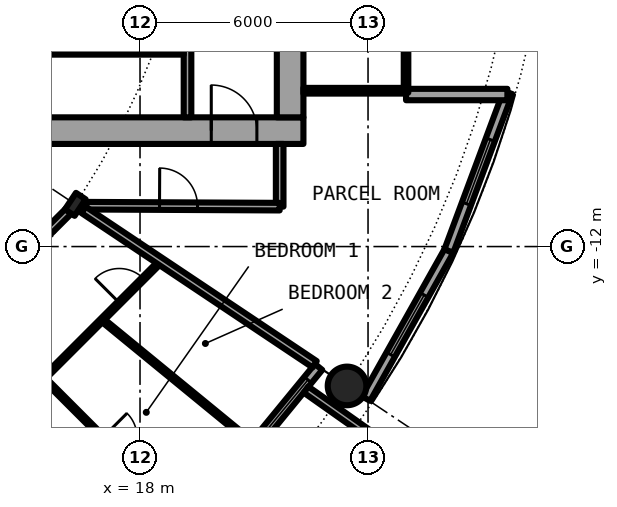
"""IFC4 building model, lengths in metres.
Left out: names, types, materials, properties, quantities, classifications, styles, units other than length and angle.
Written with IfcOpenShell. Run it as: python <this file> out.ifc"""

import sys

from ifc_helpers import new_model, si_unit, direction, frame, frame_2d, origin, origin_2d, place, context, subcontext, project, spatial, rectangle, hollow_circle, i_section, extrude, element, fill, save


model = new_model("IFC4")
c1 = context("Model", 3, precision=1e-05, world=origin(), true_north=direction((0.0, 1.0)))
c2 = subcontext(c1, "Body", "Model", "MODEL_VIEW")
j1 = project(units=[si_unit("LENGTHUNIT", "METRE"), si_unit("PLANEANGLEUNIT", "RADIAN")], contexts=[c1])
p1 = place(None, origin())
s1 = spatial("IfcSite", under=j1, at=p1, CompositionType="ELEMENT")
p2 = place(p1, origin())
s2 = spatial("IfcBuilding", under=s1, at=p2, CompositionType="ELEMENT")
p3 = place(p2, frame((0.0, 0.0, 88.0)))
s3 = spatial("IfcBuildingStorey", under=s2, at=p3, CompositionType="ELEMENT", Elevation=88.0)
p4 = place(p3, frame((23.448, -15.667, 0.0), z_axis=(0.0, 0.0, 1.0), x_axis=(1.0, 0.0, 0.0)))
e1 = element("IfcColumn", 1, at=p4, inside=s3, PredefinedType="COLUMN", context=c2, shape_type="SweptSolid", body=[
    extrude(hollow_circle(Radius=0.508, WallThickness=0.04, at=origin_2d()), origin(), (0.0, 0.0, 1.0), 3.05),
])
p5 = place(p3, frame((16.297, -10.889, 0.0), z_axis=(0.0, 0.0, 1.0), x_axis=(0.831469612303, -0.55557023302, 0.0)))
e2 = element("IfcColumn", 2, at=p5, inside=s3, PredefinedType="COLUMN", context=c2, shape_type="SweptSolid", body=[
    extrude(i_section(OverallWidth=0.306, OverallDepth=0.524, WebThickness=0.021, FlangeThickness=0.04, FilletRadius=0.027, at=origin_2d()), origin(), (0.0, 0.0, 1.0), 3.05),
])
p6 = place(p3, frame((19.304, -19.304, 0.0), z_axis=(0.0, 0.0, 1.0), x_axis=(0.634382322723, 0.773019449054, 0.0)))
e3 = element("IfcWall", 3, at=p6, inside=s3, PredefinedType="SOLIDWALL", context=c2, shape_type="SweptSolid", body=[
    extrude(rectangle(XDim=5.352, YDim=0.25, at=frame_2d((2.676, 0.0))), origin(), (0.0, 0.0, 1.0), 2.7),
])
p7 = place(p6, frame((0.841, 0.0, 0.0)))
e4 = element("IfcOpeningElement", 4, at=p7, cuts=e3, PredefinedType="OPENING", context=c2, shape_type="SweptSolid", body=[
    extrude(rectangle(XDim=1.0, YDim=2.2, at=frame_2d((0.5, 1.1))), frame((0.0, 0.135, 0.0), z_axis=(0.0, -1.0, 0.0), x_axis=(1.0, 0.0, 0.0)), (0.0, 0.0, 1.0), 0.27),
])
p8 = place(p6, frame((3.111, 0.0, 0.3)))
e5 = element("IfcOpeningElement", 5, at=p8, cuts=e3, PredefinedType="OPENING", context=c2, shape_type="SweptSolid", body=[
    extrude(rectangle(XDim=1.8, YDim=2.1, at=frame_2d((0.9, 1.05))), frame((0.0, 0.135, 0.0), z_axis=(0.0, -1.0, 0.0), x_axis=(1.0, 0.0, 0.0)), (0.0, 0.0, 1.0), 0.27),
])
p9 = place(p3, frame((22.37, -15.765, -0.03), z_axis=(0.0, 0.0, 1.0), x_axis=(0.817256123454, -0.576274612209, 0.0)))
e6 = element("IfcWall", 6, at=p9, inside=s3, PredefinedType="SOLIDWALL", context=c2, shape_type="SweptSolid", body=[
    extrude(rectangle(XDim=2.933, YDim=0.2, at=frame_2d((1.466, 0.0))), origin(), (0.0, 0.0, 1.0), 2.73),
])
p10 = place(p3, frame((23.946, -16.0, 0.0), z_axis=(0.0, 0.0, 1.0), x_axis=(0.489696356642, 0.871893042919, 0.0)))
e7 = element("IfcWall", 7, at=p10, inside=s3, PredefinedType="SOLIDWALL", context=c2, shape_type="SweptSolid", body=[
    extrude(rectangle(XDim=4.454, YDim=0.25, at=frame_2d((2.227, 0.0))), origin(), (0.0, 0.0, 1.0), 2.7),
])
p11 = place(p10, frame((1.327, 0.0, 0.3)))
e8 = element("IfcOpeningElement", 8, at=p11, cuts=e7, PredefinedType="OPENING", context=c2, shape_type="SweptSolid", body=[
    extrude(rectangle(XDim=1.8, YDim=2.1, at=frame_2d((0.9, 1.05))), frame((0.0, 0.135, 0.0), z_axis=(0.0, -1.0, 0.0), x_axis=(1.0, 0.0, 0.0)), (0.0, 0.0, 1.0), 0.27),
])
p12 = place(p3, frame((26.127, -12.117, 0.0), z_axis=(0.0, 0.0, 1.0), x_axis=(0.349247811493, 0.937030397675, 0.0)))
e9 = element("IfcWall", 9, at=p12, inside=s3, PredefinedType="SOLIDWALL", context=c2, shape_type="SweptSolid", body=[
    extrude(rectangle(XDim=4.452, YDim=0.25, at=frame_2d((2.226, 0.0))), origin(), (0.0, 0.0, 1.0), 2.7),
])
p13 = place(p12, frame((1.327, 0.0, 0.3)))
e10 = element("IfcOpeningElement", 10, at=p13, cuts=e9, PredefinedType="OPENING", context=c2, shape_type="SweptSolid", body=[
    extrude(rectangle(XDim=1.8, YDim=2.1, at=frame_2d((0.9, 1.05))), frame((0.0, 0.135, 0.0), z_axis=(0.0, -1.0, 0.0), x_axis=(1.0, 0.0, 0.0)), (0.0, 0.0, 1.0), 0.27),
])
p14 = place(p3, frame((25.0, -8.0, 0.0), z_axis=(0.0, 0.0, 1.0), x_axis=(1.0, 0.0, 0.0)))
e11 = element("IfcWall", 11, at=p14, inside=s3, PredefinedType="SOLIDWALL", context=c2, shape_type="SweptSolid", body=[
    extrude(rectangle(XDim=2.667, YDim=0.3, at=frame_2d((1.333, 0.0))), origin(), (0.0, 0.0, 1.0), 2.7),
])
p15 = place(p3, frame((8.3, -8.95, 0.0), z_axis=(0.0, 0.0, 1.0), x_axis=(1.0, 0.0, 0.0)))
e12 = element("IfcWall", 12, at=p15, inside=s3, PredefinedType="SHEAR", context=c2, shape_type="SweptSolid", body=[
    extrude(rectangle(XDim=14.0, YDim=0.7, at=frame_2d((7.0, 0.0))), origin(), (0.0, 0.0, 1.0), 3.05),
])
p16 = place(p15, frame((11.575, 0.0, 0.0)))
e13 = element("IfcOpeningElement", 13, at=p16, cuts=e12, PredefinedType="OPENING", context=c2, shape_type="SweptSolid", body=[
    extrude(rectangle(XDim=1.2, YDim=2.3, at=frame_2d((0.6, 1.15))), frame((0.0, 0.36, 0.0), z_axis=(0.0, -1.0, 0.0), x_axis=(1.0, 0.0, 0.0)), (0.0, 0.0, 1.0), 0.72),
])
p17 = place(p3, frame((21.95, 8.6, 0.0), z_axis=(0.0, 0.0, 1.0), x_axis=(0.0, -1.0, 0.0)))
e14 = element("IfcWall", 14, at=p17, inside=s3, PredefinedType="SHEAR", context=c2, shape_type="SweptSolid", body=[
    extrude(rectangle(XDim=17.2, YDim=0.7, at=frame_2d((8.6, 0.0))), origin(), (0.0, 0.0, 1.0), 3.05),
])
p18 = place(p17, frame((7.7, 0.0, 0.0)))
e15 = element("IfcOpeningElement", 15, at=p18, cuts=e14, PredefinedType="OPENING", context=c2, shape_type="SweptSolid", body=[
    extrude(rectangle(XDim=1.8, YDim=2.3, at=frame_2d((0.9, 1.15))), frame((0.0, 0.36, 0.0), z_axis=(0.0, -1.0, 0.0), x_axis=(1.0, 0.0, 0.0)), (0.0, 0.0, 1.0), 0.72),
])
p19 = place(p3, frame((19.25, -8.6, 0.0), z_axis=(0.0, 0.0, 1.0), x_axis=(0.0, 1.0, 0.0)))
e16 = element("IfcWall", 16, at=p19, inside=s3, PredefinedType="SOLIDWALL", context=c2, shape_type="SweptSolid", body=[
    extrude(rectangle(XDim=7.025, YDim=0.2, at=frame_2d((3.513, 0.0))), origin(), (0.0, 0.0, 1.0), 2.7),
])
p20 = place(p19, frame((2.35, 0.0, 0.0)))
e17 = element("IfcOpeningElement", 17, at=p20, cuts=e16, PredefinedType="OPENING", context=c2, shape_type="SweptSolid", body=[
    extrude(rectangle(XDim=1.1, YDim=2.3, at=frame_2d((0.55, 1.15))), frame((0.0, 0.11, 0.0), z_axis=(0.0, -1.0, 0.0), x_axis=(1.0, 0.0, 0.0)), (0.0, 0.0, 1.0), 0.22),
])
p21 = place(p3, frame((15.45, -6.875, 0.0), z_axis=(0.0, 0.0, 1.0), x_axis=(1.0, 0.0, 0.0)))
e18 = element("IfcWall", 18, at=p21, inside=s3, PredefinedType="PARTITIONING", context=c2, shape_type="SweptSolid", body=[
    extrude(rectangle(XDim=3.7, YDim=0.15, at=frame_2d((1.85, 0.0))), origin(), (0.0, 0.0, 1.0), 2.7),
])
p22 = place(p21, frame((1.4, 0.0, 0.0)))
e19 = element("IfcOpeningElement", 19, at=p22, cuts=e18, PredefinedType="OPENING", context=c2, shape_type="SweptSolid", body=[
    extrude(rectangle(XDim=0.9, YDim=2.3, at=frame_2d((0.45, 1.15))), frame((0.0, 0.085, 0.0), z_axis=(0.0, -1.0, 0.0), x_axis=(1.0, 0.0, 0.0)), (0.0, 0.0, 1.0), 0.17),
])
p23 = place(p3, frame((22.3, -7.9, 0.0), z_axis=(0.0, 0.0, 1.0), x_axis=(1.0, 0.0, 0.0)))
e20 = element("IfcWall", 20, at=p23, inside=s3, PredefinedType="PARTITIONING", context=c2, shape_type="SweptSolid", body=[
    extrude(rectangle(XDim=2.64, YDim=0.15, at=frame_2d((1.32, 0.0))), origin(), (0.0, 0.0, 1.0), 2.7),
])
p24 = place(p3, frame((25.0, -7.95, 0.0), z_axis=(0.0, 0.0, 1.0), x_axis=(0.0, 1.0, 0.0)))
e21 = element("IfcWall", 21, at=p24, inside=s3, PredefinedType="PARTITIONING", context=c2, shape_type="SweptSolid", body=[
    extrude(rectangle(XDim=15.9, YDim=0.12, at=frame_2d((7.95, 0.0))), origin(), (0.0, 0.0, 1.0), 2.7),
])
p25 = place(p24, frame((0.95, 0.0, 0.1)))
e22 = element("IfcOpeningElement", 22, at=p25, cuts=e21, PredefinedType="OPENING", context=c2, shape_type="SweptSolid", body=[
    extrude(rectangle(XDim=14.0, YDim=2.35, at=frame_2d((7.0, 1.175))), frame((0.0, 0.07, 0.0), z_axis=(0.0, -1.0, 0.0), x_axis=(1.0, 0.0, 0.0)), (0.0, 0.0, 1.0), 0.14),
])
p26 = place(p3, frame((15.468, -15.463, 0.0), z_axis=(0.0, 0.0, 1.0), x_axis=(0.707106781187, 0.707106781187, 0.0)))
e23 = element("IfcWall", 23, at=p26, inside=s3, PredefinedType="PARTITIONING", context=c2, shape_type="SweptSolid", body=[
    extrude(rectangle(XDim=4.351, YDim=0.1, at=frame_2d((2.176, 0.0))), origin(), (0.0, 0.0, 1.0), 2.7),
])
p27 = place(p26, frame((2.808, 0.0, 0.0)))
e24 = element("IfcOpeningElement", 24, at=p27, cuts=e23, PredefinedType="OPENING", context=c2, shape_type="SweptSolid", body=[
    extrude(rectangle(XDim=0.9, YDim=2.3, at=frame_2d((0.45, 1.15))), frame((0.0, 0.06, 0.0), z_axis=(0.0, -1.0, 0.0), x_axis=(1.0, 0.0, 0.0)), (0.0, 0.0, 1.0), 0.12),
])
p28 = place(p3, frame((21.675, -10.95, 0.0), z_axis=(0.0, 0.0, 1.0), x_axis=(0.0, 1.0, 0.0)))
e25 = element("IfcWall", 25, at=p28, inside=s3, PredefinedType="PARTITIONING", context=c2, shape_type="SweptSolid", body=[
    extrude(rectangle(XDim=1.65, YDim=0.2, at=frame_2d((0.825, 0.0))), origin(), (0.0, 0.0, 1.0), 2.7),
])
p29 = place(p3, frame((11.0, -16.186, 0.0), z_axis=(0.0, 0.0, 1.0), x_axis=(0.707106781187, 0.707106781187, 0.0)))
e26 = element("IfcWall", 26, at=p29, inside=s3, PredefinedType="PARTITIONING", context=c2, shape_type="SweptSolid", body=[
    extrude(rectangle(XDim=7.334, YDim=0.2, at=frame_2d((3.667, 0.0))), origin(), (0.0, 0.0, 1.0), 2.38),
])
p30 = place(p29, frame((4.123, 0.0, 0.0)))
e27 = element("IfcOpeningElement", 27, at=p30, cuts=e26, PredefinedType="OPENING", context=c2, shape_type="SweptSolid", body=[
    extrude(rectangle(XDim=1.0, YDim=2.3, at=frame_2d((0.5, 1.15))), frame((0.0, 0.11, 0.0), z_axis=(0.0, -1.0, 0.0), x_axis=(1.0, 0.0, 0.0)), (0.0, 0.0, 1.0), 0.22),
])
p31 = place(p3, frame((16.588, -10.925, 0.0), z_axis=(0.0, 0.0, 1.0), x_axis=(0.999988019025, -0.004895079807, 0.0)))
e28 = element("IfcWall", 28, at=p31, inside=s3, PredefinedType="PARTITIONING", context=c2, shape_type="SweptSolid", body=[
    extrude(rectangle(XDim=5.087, YDim=0.2, at=frame_2d((2.543, 0.0))), origin(), (0.0, 0.0, 1.0), 2.7),
])
p32 = place(p31, frame((1.925, 0.0, 0.0)))
e29 = element("IfcOpeningElement", 29, at=p32, cuts=e28, PredefinedType="OPENING", context=c2, shape_type="SweptSolid", body=[
    extrude(rectangle(XDim=1.0, YDim=2.3, at=frame_2d((0.5, 1.15))), frame((0.0, 0.11, 0.0), z_axis=(0.0, -1.0, 0.0), x_axis=(1.0, 0.0, 0.0)), (0.0, 0.0, 1.0), 0.22),
])
p33 = place(p3, frame((15.465, -15.465, 0.0), z_axis=(0.0, 0.0, 1.0), x_axis=(0.707106781187, -0.707106781187, 0.0)))
e30 = element("IfcWall", 30, at=p33, inside=s3, PredefinedType="PARTITIONING", context=c2, shape_type="SweptSolid", body=[
    extrude(rectangle(XDim=5.305, YDim=0.1, at=frame_2d((2.652, 0.0))), origin(), (0.0, 0.0, 1.0), 2.7),
])
p34 = place(p33, frame((2.202, 0.0, 0.0)))
e31 = element("IfcOpeningElement", 31, at=p34, cuts=e30, PredefinedType="OPENING", context=c2, shape_type="SweptSolid", body=[
    extrude(rectangle(XDim=0.9, YDim=2.3, at=frame_2d((0.45, 1.15))), frame((0.0, 0.06, 0.0), z_axis=(0.0, -1.0, 0.0), x_axis=(1.0, 0.0, 0.0)), (0.0, 0.0, 1.0), 0.12),
])
p35 = place(p3, frame((16.515, -11.035, 0.0), z_axis=(0.0, 0.0, 1.0), x_axis=(0.831505405283, -0.555516661303, 0.0)))
e32 = element("IfcWall", 32, at=p35, inside=s3, PredefinedType="PARTITIONING", context=c2, shape_type="SweptSolid", body=[
    extrude(rectangle(XDim=7.312, YDim=0.2, at=frame_2d((3.656, 0.0))), origin(), (0.0, 0.0, 1.0), 2.7),
])
p36 = place(p3, frame((17.004, -13.927, 0.0), z_axis=(0.0, 0.0, 1.0), x_axis=(0.773517471898, -0.633774976367, 0.0)))
e33 = element("IfcWall", 33, at=p36, inside=s3, PredefinedType="PARTITIONING", context=c2, shape_type="SweptSolid", body=[
    extrude(rectangle(XDim=5.196, YDim=0.1, at=frame_2d((2.598, 0.0))), origin(), (0.0, 0.0, 1.0), 2.7),
])
p37 = place(p8, origin())
e34 = element("IfcWindow", 34, at=p37, inside=s3, PartitioningType="SINGLE_PANEL", PredefinedType="WINDOW", context=c2, shape_type="SweptSolid", body=[
    extrude(rectangle(XDim=1.8, YDim=2.1, at=frame_2d((0.9, 1.05))), frame((0.0, 0.03, 0.0), z_axis=(0.0, -1.0, 0.0), x_axis=(1.0, 0.0, 0.0)), (0.0, 0.0, 1.0), 0.06),
])
fill(e5, e34)
p38 = place(p11, origin())
e35 = element("IfcWindow", 35, at=p38, inside=s3, PartitioningType="SINGLE_PANEL", PredefinedType="WINDOW", context=c2, shape_type="SweptSolid", body=[
    extrude(rectangle(XDim=1.8, YDim=2.1, at=frame_2d((0.9, 1.05))), frame((0.0, 0.03, 0.0), z_axis=(0.0, -1.0, 0.0), x_axis=(1.0, 0.0, 0.0)), (0.0, 0.0, 1.0), 0.06),
])
fill(e8, e35)
p39 = place(p13, origin())
e36 = element("IfcWindow", 36, at=p39, inside=s3, PartitioningType="SINGLE_PANEL", PredefinedType="WINDOW", context=c2, shape_type="SweptSolid", body=[
    extrude(rectangle(XDim=1.8, YDim=2.1, at=frame_2d((0.9, 1.05))), frame((0.0, 0.03, 0.0), z_axis=(0.0, -1.0, 0.0), x_axis=(1.0, 0.0, 0.0)), (0.0, 0.0, 1.0), 0.06),
])
fill(e10, e36)
p40 = place(p22, origin())
e37 = element("IfcDoor", 37, at=p40, inside=s3, OperationType="SINGLE_SWING_LEFT", PredefinedType="DOOR", context=c2, shape_type="SweptSolid", body=[
    extrude(rectangle(XDim=0.9, YDim=2.3, at=frame_2d((0.45, 1.15))), frame((0.0, 0.025, 0.0), z_axis=(0.0, -1.0, 0.0), x_axis=(1.0, 0.0, 0.0)), (0.0, 0.0, 1.0), 0.05),
])
fill(e19, e37)
p41 = place(p16, origin())
e38 = element("IfcDoor", 38, at=p41, inside=s3, OperationType="SINGLE_SWING_LEFT", PredefinedType="DOOR", context=c2, shape_type="SweptSolid", body=[
    extrude(rectangle(XDim=1.2, YDim=2.3, at=frame_2d((0.6, 1.15))), frame((0.0, 0.025, 0.0), z_axis=(0.0, -1.0, 0.0), x_axis=(1.0, 0.0, 0.0)), (0.0, 0.0, 1.0), 0.05),
])
fill(e13, e38)
p42 = place(p25, origin())
e39 = element("IfcWindow", 39, at=p42, inside=s3, PartitioningType="SINGLE_PANEL", PredefinedType="WINDOW", context=c2, shape_type="SweptSolid", body=[
    extrude(rectangle(XDim=14.0, YDim=2.35, at=frame_2d((7.0, 1.175))), frame((0.0, 0.03, 0.0), z_axis=(0.0, -1.0, 0.0), x_axis=(1.0, 0.0, 0.0)), (0.0, 0.0, 1.0), 0.06),
])
fill(e22, e39)
p43 = place(p27, origin())
e40 = element("IfcDoor", 40, at=p43, inside=s3, OperationType="SINGLE_SWING_RIGHT", PredefinedType="DOOR", context=c2, shape_type="SweptSolid", body=[
    extrude(rectangle(XDim=0.9, YDim=2.3, at=frame_2d((0.45, 1.15))), frame((0.0, 0.025, 0.0), z_axis=(0.0, -1.0, 0.0), x_axis=(1.0, 0.0, 0.0)), (0.0, 0.0, 1.0), 0.05),
])
fill(e24, e40)
p44 = place(p32, origin())
e41 = element("IfcDoor", 41, at=p44, inside=s3, OperationType="SINGLE_SWING_LEFT", PredefinedType="DOOR", context=c2, shape_type="SweptSolid", body=[
    extrude(rectangle(XDim=1.0, YDim=2.3, at=frame_2d((0.5, 1.15))), frame((0.0, 0.025, 0.0), z_axis=(0.0, -1.0, 0.0), x_axis=(1.0, 0.0, 0.0)), (0.0, 0.0, 1.0), 0.05),
])
fill(e29, e41)
save(model, sys.argv[1])
